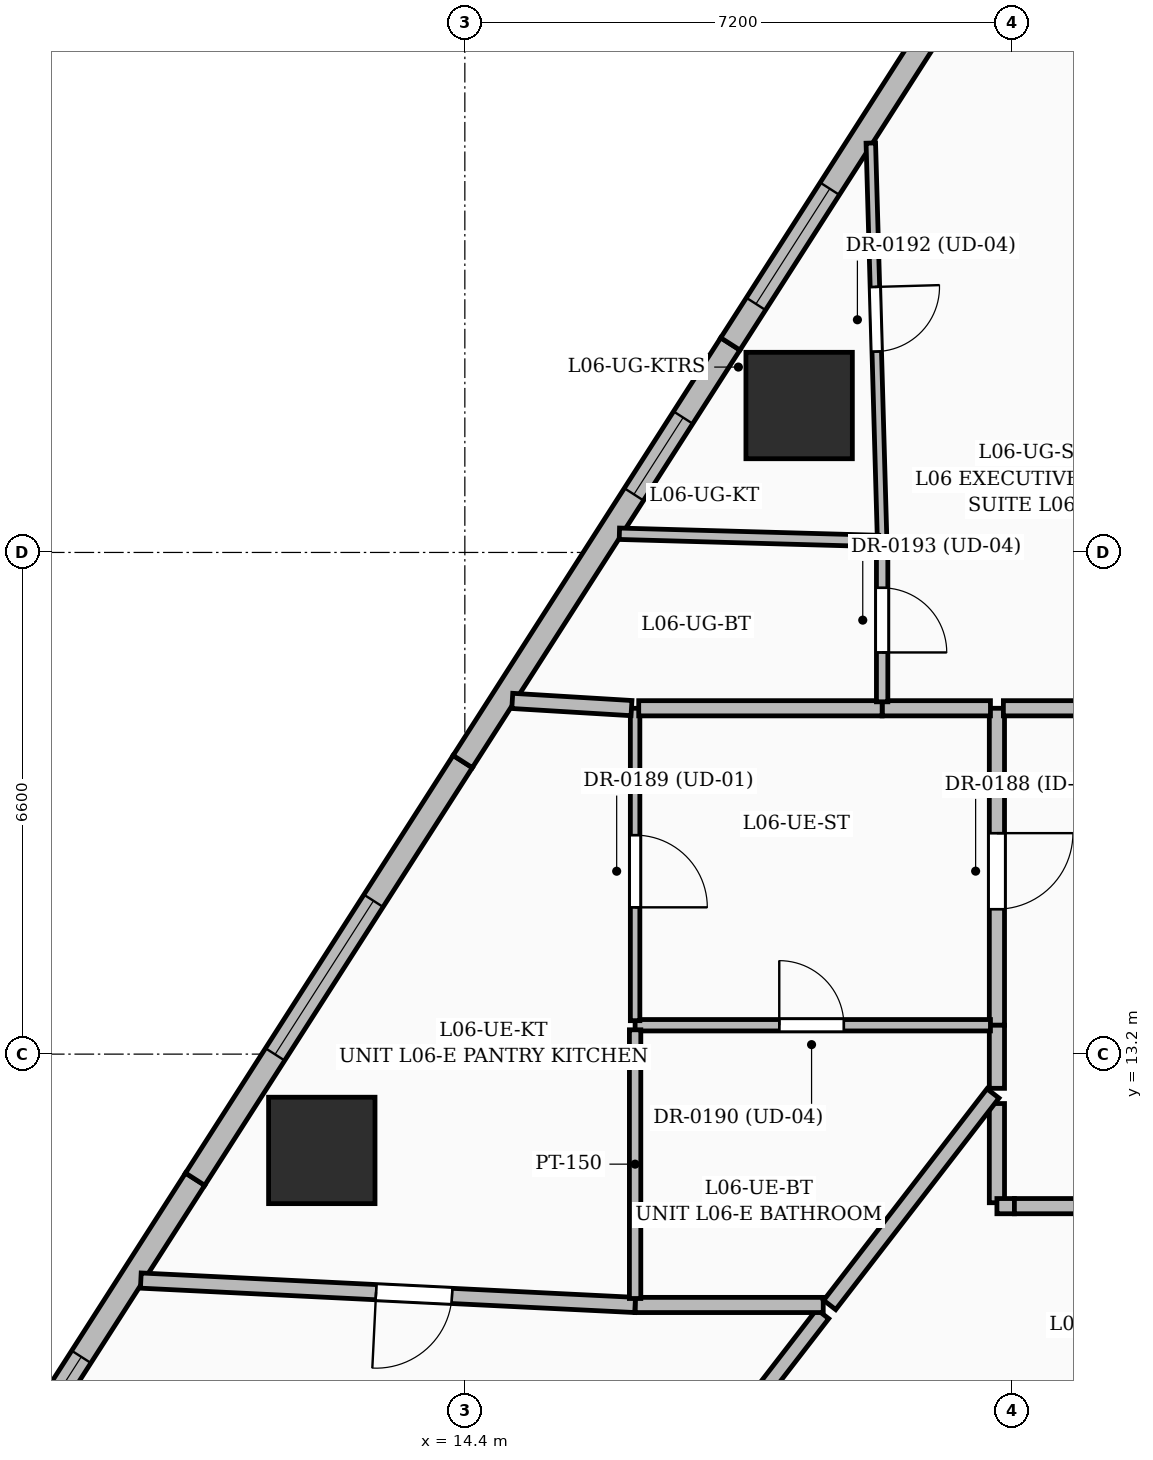
"""IFC4 building model, lengths in metres.
Left out: names, types, materials, properties, quantities, classifications, styles, units other than length and angle.
Written with IfcOpenShell. Run it as: python <this file> out.ifc"""

import sys

from ifc_helpers import new_model, si_unit, direction, frame, frame_2d, origin, origin_2d, place, context, subcontext, project, spatial, rectangle, extrude, element, fill, save


model = new_model("IFC4")
c1 = context("Model", 3, precision=1e-05, world=origin(), true_north=direction((0.0, 1.0)))
c2 = subcontext(c1, "Body", "Model", "MODEL_VIEW")
j1 = project(units=[si_unit("LENGTHUNIT", "METRE"), si_unit("PLANEANGLEUNIT", "RADIAN")], contexts=[c1])
p1 = place(None, origin())
s1 = spatial("IfcSite", under=j1, at=p1, CompositionType="ELEMENT")
p2 = place(p1, origin())
s2 = spatial("IfcBuilding", under=s1, at=p2, CompositionType="ELEMENT")
p3 = place(p2, frame((0.0, 0.0, 31.8)))
s3 = spatial("IfcBuildingStorey", under=s2, at=p3, CompositionType="ELEMENT", Elevation=31.8)
for number, where, z_axis, x_axis in (
    (1, (18.798, 21.733, 0.0), (0.0, 0.0, 1.0), (1.0, 0.0, 0.0)),
    (2, (12.518, 11.933, 0.0), (0.0, 0.0, 1.0), (1.0, 0.0, 0.0)),
):
    element("IfcColumn", number, at=place(p3, frame(where, z_axis=z_axis, x_axis=x_axis)), inside=s3, PredefinedType="COLUMN", context=c2, shape_type="SweptSolid", body=[
        extrude(rectangle(XDim=1.4, YDim=1.4, at=origin_2d()), origin(), (0.0, 0.0, 1.0), 3.6),
    ])
p4 = place(p3, frame((7.668, 6.586, 0.0), z_axis=(0.0, 0.0, 1.0), x_axis=(0.539504449159, 0.841982748836, 0.0)))
e3 = element("IfcWall", 3, at=p4, inside=s3, PredefinedType="SOLIDWALL", context=c2, shape_type="SweptSolid", body=[
    extrude(rectangle(XDim=5.901, YDim=0.3, at=frame_2d((2.95, 0.0))), origin(), (0.0, 0.0, 1.0), 3.35),
])
p5 = place(p4, frame((1.925, 0.0, 0.8)))
e4 = element("IfcOpeningElement", 4, at=p5, cuts=e3, PredefinedType="OPENING", context=c2, shape_type="SweptSolid", body=[
    extrude(rectangle(XDim=1.2, YDim=1.8, at=frame_2d((0.6, 0.9))), frame((0.0, 0.16, 0.0), z_axis=(0.0, -1.0, 0.0), x_axis=(1.0, 0.0, 0.0)), (0.0, 0.0, 1.0), 0.32),
])
p6 = place(p3, frame((10.851, 11.555, 0.0), z_axis=(0.0, 0.0, 1.0), x_axis=(0.539526045631, 0.841968910403, 0.0)))
e5 = element("IfcWall", 5, at=p6, inside=s3, PredefinedType="SOLIDWALL", context=c2, shape_type="SweptSolid", body=[
    extrude(rectangle(XDim=6.526, YDim=0.3, at=frame_2d((3.263, 0.0))), origin(), (0.0, 0.0, 1.0), 3.35),
])
p7 = place(p6, frame((1.95, 0.0, 0.6)))
e6 = element("IfcOpeningElement", 6, at=p7, cuts=e5, PredefinedType="OPENING", context=c2, shape_type="SweptSolid", body=[
    extrude(rectangle(XDim=2.4, YDim=2.1, at=frame_2d((1.2, 1.05))), frame((0.0, 0.16, 0.0), z_axis=(0.0, -1.0, 0.0), x_axis=(1.0, 0.0, 0.0)), (0.0, 0.0, 1.0), 0.32),
])
p8 = place(p3, frame((14.372, 17.049, 0.0), z_axis=(0.0, 0.0, 1.0), x_axis=(0.539499522652, 0.841985905498, 0.0)))
e7 = element("IfcWall", 7, at=p8, inside=s3, PredefinedType="SOLIDWALL", context=c2, shape_type="SweptSolid", body=[
    extrude(rectangle(XDim=6.525, YDim=0.3, at=frame_2d((3.263, 0.0))), origin(), (0.0, 0.0, 1.0), 3.35),
])
p9 = place(p8, frame((4.175, 0.0, 0.8)))
e8 = element("IfcOpeningElement", 8, at=p9, cuts=e7, PredefinedType="OPENING", context=c2, shape_type="SweptSolid", body=[
    extrude(rectangle(XDim=1.2, YDim=1.8, at=frame_2d((0.6, 0.9))), frame((0.0, 0.16, 0.0), z_axis=(0.0, -1.0, 0.0), x_axis=(1.0, 0.0, 0.0)), (0.0, 0.0, 1.0), 0.32),
])
p10 = place(p3, frame((17.893, 22.543, 0.0), z_axis=(0.0, 0.0, 1.0), x_axis=(0.539539053693, 0.841960574813, 0.0)))
e9 = element("IfcWall", 9, at=p10, inside=s3, PredefinedType="SOLIDWALL", context=c2, shape_type="SweptSolid", body=[
    extrude(rectangle(XDim=6.251, YDim=0.3, at=frame_2d((3.125, 0.0))), origin(), (0.0, 0.0, 1.0), 3.35),
])
p11 = place(p10, frame((0.625, 0.0, 0.6)))
e10 = element("IfcOpeningElement", 10, at=p11, cuts=e9, PredefinedType="OPENING", context=c2, shape_type="SweptSolid", body=[
    extrude(rectangle(XDim=1.8, YDim=2.1, at=frame_2d((0.9, 1.05))), frame((0.0, 0.16, 0.0), z_axis=(0.0, -1.0, 0.0), x_axis=(1.0, 0.0, 0.0)), (0.0, 0.0, 1.0), 0.32),
])
p12 = place(p3, frame((21.4, 12.55, 0.0), z_axis=(0.0, 0.0, 1.0), x_axis=(0.0, -1.0, 0.0)))
e11 = element("IfcWall", 11, at=p12, inside=s3, PredefinedType="PARTITIONING", context=c2, shape_type="SweptSolid", body=[
    extrude(rectangle(XDim=1.305, YDim=0.2, at=frame_2d((0.652, 0.0))), origin(), (0.0, 0.0, 1.0), 3.35),
])
p13 = place(p3, frame((21.4, 11.2, 0.0), z_axis=(0.0, 0.0, 1.0), x_axis=(1.0, 0.0, 0.0)))
e12 = element("IfcWall", 12, at=p13, inside=s3, PredefinedType="PARTITIONING", context=c2, shape_type="SweptSolid", body=[
    extrude(rectangle(XDim=0.23, YDim=0.2, at=frame_2d((0.115, 0.0))), origin(), (0.0, 0.0, 1.0), 2.709),
])
p14 = place(p3, frame((21.63, 11.2, 0.0), z_axis=(0.0, 0.0, 1.0), x_axis=(1.0, 0.0, 0.0)))
e13 = element("IfcWall", 13, at=p14, inside=s3, PredefinedType="PARTITIONING", context=c2, shape_type="SweptSolid", body=[
    extrude(rectangle(XDim=3.239, YDim=0.2, at=frame_2d((1.62, 0.0))), origin(), (0.0, 0.0, 1.0), 2.709),
])
p15 = place(p14, frame((1.185, 0.0, 0.0)))
e14 = element("IfcOpeningElement", 14, at=p15, cuts=e13, PredefinedType="OPENING", context=c2, shape_type="SweptSolid", body=[
    extrude(rectangle(XDim=0.95, YDim=2.2, at=frame_2d((0.475, 1.1))), frame((0.0, 0.11, 0.0), z_axis=(0.0, -1.0, 0.0), x_axis=(1.0, 0.0, 0.0)), (0.0, 0.0, 1.0), 0.22),
])
p16 = place(p3, frame((21.4, 17.75, 0.0), z_axis=(0.0, 0.0, 1.0), x_axis=(0.0, -1.0, 0.0)))
e15 = element("IfcWall", 15, at=p16, inside=s3, PredefinedType="PARTITIONING", context=c2, shape_type="SweptSolid", body=[
    extrude(rectangle(XDim=4.17, YDim=0.2, at=frame_2d((2.085, 0.0))), origin(), (0.0, 0.0, 1.0), 2.709),
])
p17 = place(p16, frame((1.643, 0.0, 0.0)))
e16 = element("IfcOpeningElement", 16, at=p17, cuts=e15, PredefinedType="OPENING", context=c2, shape_type="SweptSolid", body=[
    extrude(rectangle(XDim=1.0, YDim=2.2, at=frame_2d((0.5, 1.1))), frame((0.0, 0.11, 0.0), z_axis=(0.0, -1.0, 0.0), x_axis=(1.0, 0.0, 0.0)), (0.0, 0.0, 1.0), 0.22),
])
p18 = place(p3, frame((21.4, 13.58, 0.0), z_axis=(0.0, 0.0, 1.0), x_axis=(0.0, -1.0, 0.0)))
e17 = element("IfcWall", 17, at=p18, inside=s3, PredefinedType="PARTITIONING", context=c2, shape_type="SweptSolid", body=[
    extrude(rectangle(XDim=0.83, YDim=0.2, at=frame_2d((0.415, 0.0))), origin(), (0.0, 0.0, 1.0), 3.35),
])
p19 = place(p3, frame((24.4, 17.75, 0.0), z_axis=(0.0, 0.0, 1.0), x_axis=(-1.0, 0.0, 0.0)))
e18 = element("IfcWall", 18, at=p19, inside=s3, PredefinedType="PARTITIONING", context=c2, shape_type="SweptSolid", body=[
    extrude(rectangle(XDim=2.915, YDim=0.2, at=frame_2d((1.458, 0.0))), origin(), (0.0, 0.0, 1.0), 2.228),
])
p20 = place(p19, frame((1.05, 0.0, 0.0)))
e19 = element("IfcOpeningElement", 19, at=p20, cuts=e18, PredefinedType="OPENING", context=c2, shape_type="SweptSolid", body=[
    extrude(rectangle(XDim=0.9, YDim=2.1, at=frame_2d((0.45, 1.05))), frame((0.0, 0.11, 0.0), z_axis=(0.0, -1.0, 0.0), x_axis=(1.0, 0.0, 0.0)), (0.0, 0.0, 1.0), 0.22),
])
p21 = place(p3, frame((16.279, 6.118, 0.0), z_axis=(0.0, 0.0, 1.0), x_axis=(0.611231323246, 0.791452000745, 0.0)))
e20 = element("IfcWall", 20, at=p21, inside=s3, PredefinedType="PARTITIONING", context=c2, shape_type="SweptSolid", body=[
    extrude(rectangle(XDim=4.629, YDim=0.2, at=frame_2d((2.314, 0.0))), origin(), (0.0, 0.0, 1.0), 2.228),
])
p22 = place(p3, frame((19.115, 9.9, 0.0), z_axis=(0.0, 0.0, 1.0), x_axis=(-1.0, 0.0, 0.0)))
e21 = element("IfcWall", 21, at=p22, inside=s3, PredefinedType="PARTITIONING", context=c2, shape_type="SweptSolid", body=[
    extrude(rectangle(XDim=2.475, YDim=0.2, at=frame_2d((1.238, 0.0))), origin(), (0.0, 0.0, 1.0), 2.228),
])
p23 = place(p3, frame((16.64, 9.9, 0.0), z_axis=(0.0, 0.0, 1.0), x_axis=(-0.998783560552, 0.049309219933, 0.0)))
e22 = element("IfcWall", 22, at=p23, inside=s3, PredefinedType="PARTITIONING", context=c2, shape_type="SweptSolid", body=[
    extrude(rectangle(XDim=6.511, YDim=0.2, at=frame_2d((3.255, 0.0))), origin(), (0.0, 0.0, 1.0), 2.37),
])
p24 = place(p23, frame((2.412, 0.0, 0.0)))
e23 = element("IfcOpeningElement", 23, at=p24, cuts=e22, PredefinedType="OPENING", context=c2, shape_type="SweptSolid", body=[
    extrude(rectangle(XDim=1.0, YDim=2.2, at=frame_2d((0.5, 1.1))), frame((0.0, 0.11, 0.0), z_axis=(0.0, -1.0, 0.0), x_axis=(1.0, 0.0, 0.0)), (0.0, 0.0, 1.0), 0.22),
])
p25 = place(p3, frame((21.348, 12.683, 0.0), z_axis=(0.0, 0.0, 1.0), x_axis=(-0.611075844668, -0.791572051088, 0.0)))
e24 = element("IfcWall", 24, at=p25, inside=s3, PredefinedType="PARTITIONING", context=c2, shape_type="SweptSolid", body=[
    extrude(rectangle(XDim=3.515, YDim=0.2, at=frame_2d((1.758, 0.0))), origin(), (0.0, 0.0, 1.0), 2.228),
])
p26 = place(p3, frame((16.64, 13.58, 0.0), z_axis=(0.0, 0.0, 1.0), x_axis=(1.0, 0.0, 0.0)))
e25 = element("IfcWall", 25, at=p26, inside=s3, PredefinedType="PARTITIONING", context=c2, shape_type="SweptSolid", body=[
    extrude(rectangle(XDim=4.675, YDim=0.15, at=frame_2d((2.337, 0.0))), origin(), (0.0, 0.0, 1.0), 2.709),
])
p27 = place(p26, frame((1.896, 0.0, 0.0)))
e26 = element("IfcOpeningElement", 26, at=p27, cuts=e25, PredefinedType="OPENING", context=c2, shape_type="SweptSolid", body=[
    extrude(rectangle(XDim=0.85, YDim=2.1, at=frame_2d((0.425, 1.05))), frame((0.0, 0.085, 0.0), z_axis=(0.0, -1.0, 0.0), x_axis=(1.0, 0.0, 0.0)), (0.0, 0.0, 1.0), 0.17),
])
p28 = place(p3, frame((16.64, 17.75, 0.0), z_axis=(0.0, 0.0, 1.0), x_axis=(0.0, -1.0, 0.0)))
e27 = element("IfcWall", 27, at=p28, inside=s3, PredefinedType="PARTITIONING", context=c2, shape_type="SweptSolid", body=[
    extrude(rectangle(XDim=4.11, YDim=0.125, at=frame_2d((2.055, 0.0))), origin(), (0.0, 0.0, 1.0), 3.35),
])
p29 = place(p28, frame((1.669, 0.0, 0.0)))
e28 = element("IfcOpeningElement", 28, at=p29, cuts=e27, PredefinedType="OPENING", context=c2, shape_type="SweptSolid", body=[
    extrude(rectangle(XDim=0.95, YDim=2.2, at=frame_2d((0.475, 1.1))), frame((0.0, 0.072, 0.0), z_axis=(0.0, -1.0, 0.0), x_axis=(1.0, 0.0, 0.0)), (0.0, 0.0, 1.0), 0.145),
])
p30 = place(p3, frame((21.315, 17.75, 0.0), z_axis=(0.0, 0.0, 1.0), x_axis=(-1.0, 0.0, 0.0)))
e29 = element("IfcWall", 29, at=p30, inside=s3, PredefinedType="PARTITIONING", context=c2, shape_type="SweptSolid", body=[
    extrude(rectangle(XDim=1.425, YDim=0.2, at=frame_2d((0.712, 0.0))), origin(), (0.0, 0.0, 1.0), 2.709),
])
p31 = place(p3, frame((19.89, 17.75, 0.0), z_axis=(0.0, 0.0, 1.0), x_axis=(-1.0, 0.0, 0.0)))
e30 = element("IfcWall", 30, at=p31, inside=s3, PredefinedType="PARTITIONING", context=c2, shape_type="SweptSolid", body=[
    extrude(rectangle(XDim=3.202, YDim=0.2, at=frame_2d((1.601, 0.0))), origin(), (0.0, 0.0, 1.0), 3.35),
])
p32 = place(p3, frame((16.64, 13.52, 0.0), z_axis=(0.0, 0.0, 1.0), x_axis=(0.0, -1.0, 0.0)))
e31 = element("IfcWall", 31, at=p32, inside=s3, PredefinedType="PARTITIONING", context=c2, shape_type="SweptSolid", body=[
    extrude(rectangle(XDim=3.535, YDim=0.15, at=frame_2d((1.768, 0.0))), origin(), (0.0, 0.0, 1.0), 2.228),
])
p33 = place(p3, frame((16.593, 17.752, 0.0), z_axis=(0.0, 0.0, 1.0), x_axis=(-0.998181550188, 0.060279290502, 0.0)))
e32 = element("IfcWall", 32, at=p33, inside=s3, PredefinedType="PARTITIONING", context=c2, shape_type="SweptSolid", body=[
    extrude(rectangle(XDim=1.572, YDim=0.2, at=frame_2d((0.786, 0.0))), origin(), (0.0, 0.0, 1.0), 2.37),
])
p34 = place(p3, frame((19.741, 25.186, 0.0), z_axis=(0.0, 0.0, 1.0), x_axis=(0.028430709053, -0.999595765689, 0.0)))
e33 = element("IfcWall", 33, at=p34, inside=s3, PredefinedType="PARTITIONING", context=c2, shape_type="SweptSolid", body=[
    extrude(rectangle(XDim=5.238, YDim=0.125, at=frame_2d((2.619, 0.0))), origin(), (0.0, 0.0, 1.0), 2.228),
])
p35 = place(p34, frame((1.894, 0.0, 0.0)))
e34 = element("IfcOpeningElement", 34, at=p35, cuts=e33, PredefinedType="OPENING", context=c2, shape_type="SweptSolid", body=[
    extrude(rectangle(XDim=0.85, YDim=2.1, at=frame_2d((0.425, 1.05))), frame((0.0, 0.072, 0.0), z_axis=(0.0, -1.0, 0.0), x_axis=(1.0, 0.0, 0.0)), (0.0, 0.0, 1.0), 0.145),
])
p36 = place(p3, frame((19.89, 19.95, 0.0), z_axis=(0.0, 0.0, 1.0), x_axis=(0.0, -1.0, 0.0)))
e35 = element("IfcWall", 35, at=p36, inside=s3, PredefinedType="PARTITIONING", context=c2, shape_type="SweptSolid", body=[
    extrude(rectangle(XDim=2.115, YDim=0.15, at=frame_2d((1.058, 0.0))), origin(), (0.0, 0.0, 1.0), 3.35),
])
p37 = place(p36, frame((0.615, 0.0, 0.0)))
e36 = element("IfcOpeningElement", 36, at=p37, cuts=e35, PredefinedType="OPENING", context=c2, shape_type="SweptSolid", body=[
    extrude(rectangle(XDim=0.85, YDim=2.1, at=frame_2d((0.425, 1.05))), frame((0.0, 0.085, 0.0), z_axis=(0.0, -1.0, 0.0), x_axis=(1.0, 0.0, 0.0)), (0.0, 0.0, 1.0), 0.17),
])
p38 = place(p3, frame((16.433, 20.046, 0.0), z_axis=(0.0, 0.0, 1.0), x_axis=(0.999614255068, -0.027773027638, 0.0)))
e37 = element("IfcWall", 37, at=p38, inside=s3, PredefinedType="PARTITIONING", context=c2, shape_type="SweptSolid", body=[
    extrude(rectangle(XDim=3.411, YDim=0.15, at=frame_2d((1.705, 0.0))), origin(), (0.0, 0.0, 1.0), 2.37),
])
p39 = place(p5, origin())
e38 = element("IfcWindow", 38, at=p39, inside=s3, PartitioningType="SINGLE_PANEL", PredefinedType="WINDOW", context=c2, shape_type="SweptSolid", body=[
    extrude(rectangle(XDim=1.2, YDim=1.8, at=frame_2d((0.6, 0.9))), frame((0.0, 0.03, 0.0), z_axis=(0.0, -1.0, 0.0), x_axis=(1.0, 0.0, 0.0)), (0.0, 0.0, 1.0), 0.06),
])
fill(e4, e38)
p40 = place(p7, origin())
e39 = element("IfcWindow", 39, at=p40, inside=s3, PartitioningType="SINGLE_PANEL", PredefinedType="WINDOW", context=c2, shape_type="SweptSolid", body=[
    extrude(rectangle(XDim=2.4, YDim=2.1, at=frame_2d((1.2, 1.05))), frame((0.0, 0.03, 0.0), z_axis=(0.0, -1.0, 0.0), x_axis=(1.0, 0.0, 0.0)), (0.0, 0.0, 1.0), 0.06),
])
fill(e6, e39)
p41 = place(p9, origin())
e40 = element("IfcWindow", 40, at=p41, inside=s3, PartitioningType="SINGLE_PANEL", PredefinedType="WINDOW", context=c2, shape_type="SweptSolid", body=[
    extrude(rectangle(XDim=1.2, YDim=1.8, at=frame_2d((0.6, 0.9))), frame((0.0, 0.03, 0.0), z_axis=(0.0, -1.0, 0.0), x_axis=(1.0, 0.0, 0.0)), (0.0, 0.0, 1.0), 0.06),
])
fill(e8, e40)
p42 = place(p11, origin())
e41 = element("IfcWindow", 41, at=p42, inside=s3, PartitioningType="SINGLE_PANEL", PredefinedType="WINDOW", context=c2, shape_type="SweptSolid", body=[
    extrude(rectangle(XDim=1.8, YDim=2.1, at=frame_2d((0.9, 1.05))), frame((0.0, 0.03, 0.0), z_axis=(0.0, -1.0, 0.0), x_axis=(1.0, 0.0, 0.0)), (0.0, 0.0, 1.0), 0.06),
])
fill(e10, e41)
p43 = place(p17, origin())
e42 = element("IfcDoor", 42, at=p43, inside=s3, OperationType="SINGLE_SWING_LEFT", PredefinedType="DOOR", context=c2, shape_type="SweptSolid", body=[
    extrude(rectangle(XDim=1.0, YDim=2.2, at=frame_2d((0.5, 1.1))), frame((0.0, 0.025, 0.0), z_axis=(0.0, -1.0, 0.0), x_axis=(1.0, 0.0, 0.0)), (0.0, 0.0, 1.0), 0.05),
])
fill(e16, e42)
p44 = place(p29, origin())
e43 = element("IfcDoor", 43, at=p44, inside=s3, OperationType="SINGLE_SWING_RIGHT", PredefinedType="DOOR", context=c2, shape_type="SweptSolid", body=[
    extrude(rectangle(XDim=0.95, YDim=2.2, at=frame_2d((0.475, 1.1))), frame((0.0, 0.025, 0.0), z_axis=(0.0, -1.0, 0.0), x_axis=(1.0, 0.0, 0.0)), (0.0, 0.0, 1.0), 0.05),
])
fill(e28, e43)
p45 = place(p27, origin())
e44 = element("IfcDoor", 44, at=p45, inside=s3, OperationType="SINGLE_SWING_LEFT", PredefinedType="DOOR", context=c2, shape_type="SweptSolid", body=[
    extrude(rectangle(XDim=0.85, YDim=2.1, at=frame_2d((0.425, 1.05))), frame((0.0, 0.025, 0.0), z_axis=(0.0, -1.0, 0.0), x_axis=(1.0, 0.0, 0.0)), (0.0, 0.0, 1.0), 0.05),
])
fill(e26, e44)
p46 = place(p35, origin())
e45 = element("IfcDoor", 45, at=p46, inside=s3, OperationType="SINGLE_SWING_LEFT", PredefinedType="DOOR", context=c2, shape_type="SweptSolid", body=[
    extrude(rectangle(XDim=0.85, YDim=2.1, at=frame_2d((0.425, 1.05))), frame((0.0, 0.025, 0.0), z_axis=(0.0, -1.0, 0.0), x_axis=(1.0, 0.0, 0.0)), (0.0, 0.0, 1.0), 0.05),
])
fill(e34, e45)
p47 = place(p37, origin())
e46 = element("IfcDoor", 46, at=p47, inside=s3, OperationType="SINGLE_SWING_RIGHT", PredefinedType="DOOR", context=c2, shape_type="SweptSolid", body=[
    extrude(rectangle(XDim=0.85, YDim=2.1, at=frame_2d((0.425, 1.05))), frame((0.0, 0.025, 0.0), z_axis=(0.0, -1.0, 0.0), x_axis=(1.0, 0.0, 0.0)), (0.0, 0.0, 1.0), 0.05),
])
fill(e36, e46)
p48 = place(p24, origin())
e47 = element("IfcDoor", 47, at=p48, inside=s3, OperationType="SINGLE_SWING_RIGHT", PredefinedType="DOOR", context=c2, shape_type="SweptSolid", body=[
    extrude(rectangle(XDim=1.0, YDim=2.2, at=frame_2d((0.5, 1.1))), frame((0.0, 0.025, 0.0), z_axis=(0.0, -1.0, 0.0), x_axis=(1.0, 0.0, 0.0)), (0.0, 0.0, 1.0), 0.05),
])
fill(e23, e47)
save(model, sys.argv[1])
